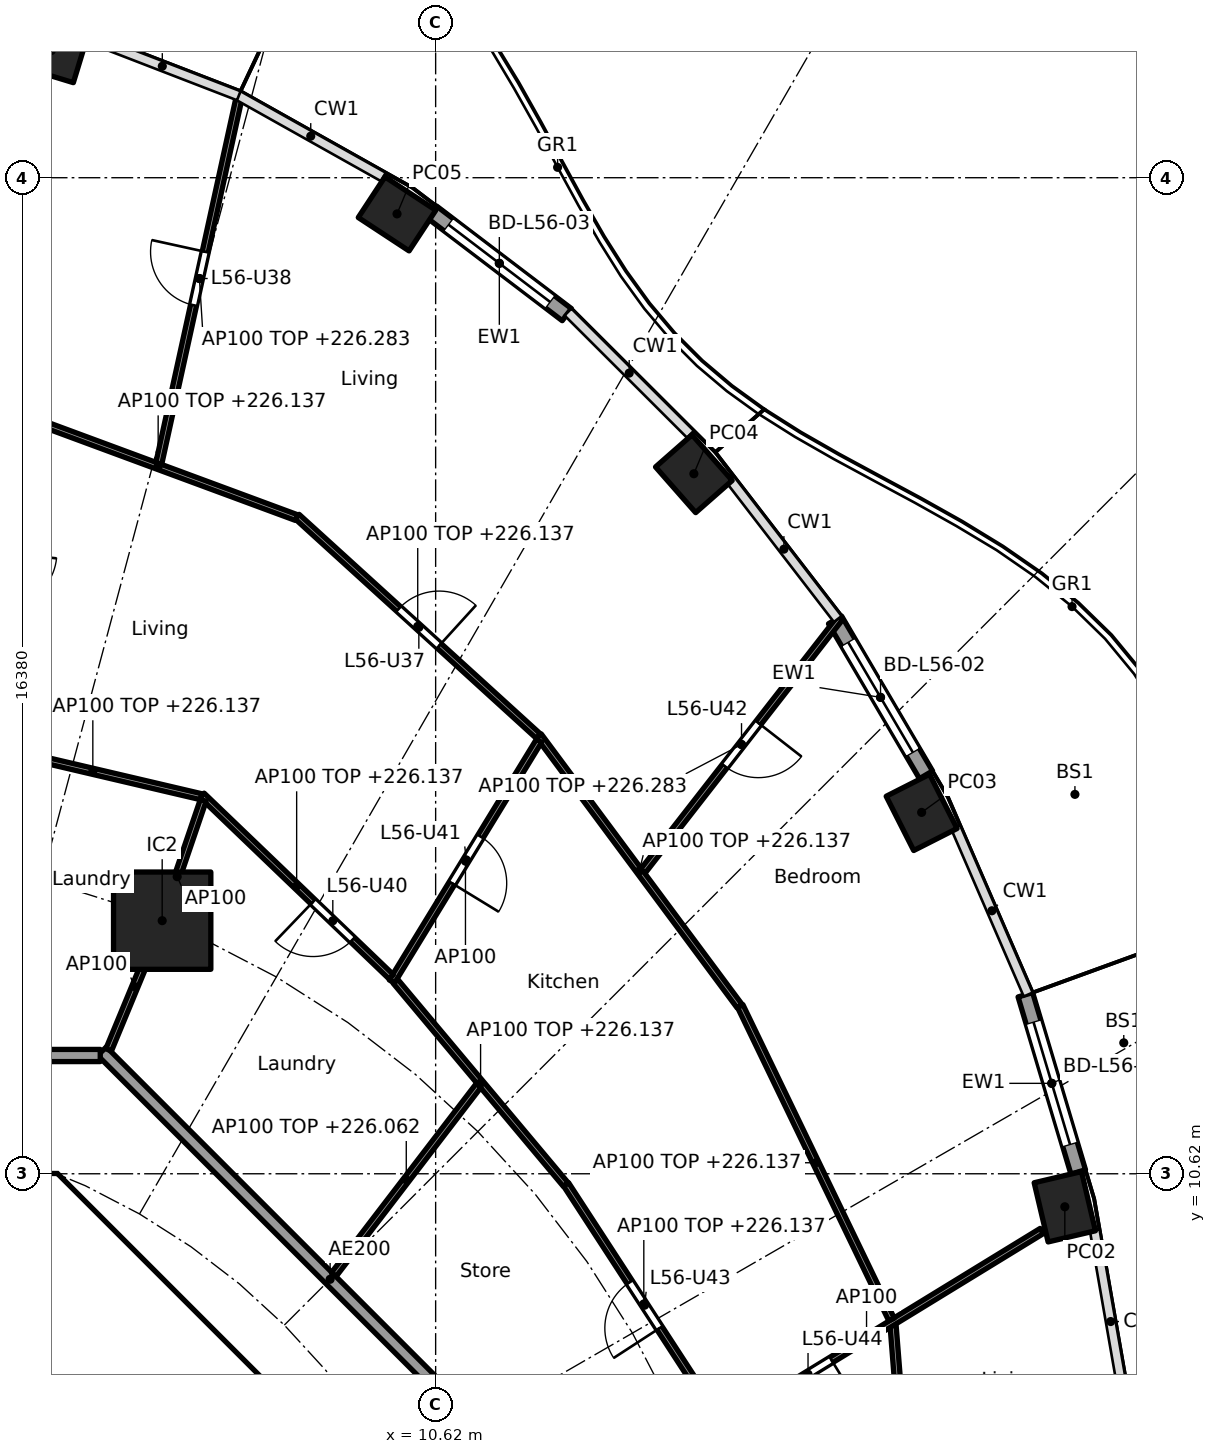
"""IFC4 building model, lengths in metres.
Left out: names, types, materials, properties, quantities, classifications, styles, units other than length and angle.
Written with IfcOpenShell. Run it as: python <this file> out.ifc"""

import sys

from ifc_helpers import new_model, si_unit, direction, frame, frame_2d, origin, origin_2d, place, context, subcontext, project, spatial, polyline, rectangle, hollow_rectangle, outline, extrude, element, fill, save


model = new_model("IFC4")
c1 = context("Model", 3, precision=1e-05, world=origin(), true_north=direction((0.0, 1.0)))
c2 = subcontext(c1, "Body", "Model", "MODEL_VIEW")
j1 = project(units=[si_unit("LENGTHUNIT", "METRE"), si_unit("PLANEANGLEUNIT", "RADIAN")], contexts=[c1])
p1 = place(None, origin())
s1 = spatial("IfcSite", under=j1, at=p1, CompositionType="ELEMENT")
p2 = place(p1, origin())
s2 = spatial("IfcBuilding", under=s1, at=p2, CompositionType="ELEMENT")
p3 = place(p2, frame((0.0, 0.0, 223.3)))
s3 = spatial("IfcBuildingStorey", under=s2, at=p3, CompositionType="ELEMENT", Elevation=223.3)
for number, where, z_axis, x_axis in (
    (1, (20.967, 10.077, 0.0), (0.0, 0.0, 1.0), (-0.229, 0.973, 0.0)),
    (2, (18.612, 16.563, 0.0), (0.0, 0.0, 1.0), (-0.452, 0.892, 0.0)),
    (3, (14.866, 22.132, 0.0), (0.0, 0.0, 1.0), (-0.66, 0.751, 0.0)),
    (4, (9.985, 26.405, 0.0), (0.0, 0.0, 1.0), (-0.836, 0.549, 0.0)),
    (5, (4.3, 29.092, 0.0), (0.0, 0.0, 1.0), (-0.957, 0.292, 0.0)),
):
    element("IfcColumn", number, at=place(p3, frame(where, z_axis=z_axis, x_axis=x_axis)), inside=s3, PredefinedType="COLUMN", context=c2, shape_type="SweptSolid", body=[
        extrude(hollow_rectangle(XDim=1.0, YDim=0.8, WallThickness=0.032, at=origin_2d()), origin(), (0.0, 0.0, 1.0), 3.7),
    ])
p4 = place(p3, frame((6.123, 14.782, 0.0), z_axis=(0.0, 0.0, 1.0), x_axis=(1.0, 0.0, 0.0)))
e6 = element("IfcColumn", 6, at=p4, inside=s3, PredefinedType="COLUMN", context=c2, shape_type="SweptSolid", body=[
    extrude(rectangle(XDim=1.6, YDim=1.6, at=origin_2d()), origin(), (0.0, 0.0, 1.0), 3.7),
])
p5 = place(p3, frame((20.318, 13.564, 0.0), z_axis=(0.0, 0.0, 1.0), x_axis=(0.285785716255, -0.958293548128, 0.0)))
e7 = element("IfcWall", 7, at=p5, inside=s3, PredefinedType="SOLIDWALL", context=c2, shape_type="SweptSolid", body=[
    extrude(rectangle(XDim=3.04, YDim=0.25, at=frame_2d((1.52, 0.0))), origin(), (0.0, 0.0, 1.0), 3.44),
])
p6 = place(p5, frame((0.47, 0.0, 0.0)))
e8 = element("IfcOpeningElement", 8, at=p6, cuts=e7, PredefinedType="OPENING", context=c2, shape_type="SweptSolid", body=[
    extrude(rectangle(XDim=2.1, YDim=2.4, at=frame_2d((1.05, 1.2))), frame((0.0, 0.135, 0.0), z_axis=(0.0, -1.0, 0.0), x_axis=(1.0, 0.0, 0.0)), (0.0, 0.0, 1.0), 0.27),
])
p7 = place(p3, frame((17.188, 19.728, 0.0), z_axis=(0.0, 0.0, 1.0), x_axis=(0.506391620556, -0.862303616269, 0.0)))
e9 = element("IfcWall", 9, at=p7, inside=s3, PredefinedType="SOLIDWALL", context=c2, shape_type="SweptSolid", body=[
    extrude(rectangle(XDim=2.954, YDim=0.25, at=frame_2d((1.477, 0.0))), origin(), (0.0, 0.0, 1.0), 3.44),
])
p8 = place(p7, frame((0.427, 0.0, 0.0)))
e10 = element("IfcOpeningElement", 10, at=p8, cuts=e9, PredefinedType="OPENING", context=c2, shape_type="SweptSolid", body=[
    extrude(rectangle(XDim=2.1, YDim=2.4, at=frame_2d((1.05, 1.2))), frame((0.0, 0.135, 0.0), z_axis=(0.0, -1.0, 0.0), x_axis=(1.0, 0.0, 0.0)), (0.0, 0.0, 1.0), 0.27),
])
p9 = place(p3, frame((10.557, 26.436, 0.0), z_axis=(0.0, 0.0, 1.0), x_axis=(0.796022158395, -0.605267480825, 0.0)))
e11 = element("IfcWall", 11, at=p9, inside=s3, PredefinedType="SOLIDWALL", context=c2, shape_type="SweptSolid", body=[
    extrude(rectangle(XDim=2.789, YDim=0.25, at=frame_2d((1.395, 0.0))), origin(), (0.0, 0.0, 1.0), 3.44),
])
p10 = place(p9, frame((0.344, 0.0, 0.0)))
e12 = element("IfcOpeningElement", 12, at=p10, cuts=e11, PredefinedType="OPENING", context=c2, shape_type="SweptSolid", body=[
    extrude(rectangle(XDim=2.1, YDim=2.4, at=frame_2d((1.05, 1.2))), frame((0.0, 0.135, 0.0), z_axis=(0.0, -1.0, 0.0), x_axis=(1.0, 0.0, 0.0)), (0.0, 0.0, 1.0), 0.27),
])
p11 = place(p3, frame((9.988, 4.613, 0.0), z_axis=(0.0, 0.0, 1.0), x_axis=(-0.707106781187, 0.707106781187, 0.0)))
e13 = element("IfcWall", 13, at=p11, inside=s3, PredefinedType="SHEAR", context=c2, shape_type="SweptSolid", body=[
    extrude(rectangle(XDim=7.602, YDim=0.6, at=frame_2d((3.801, 0.0))), origin(), (0.0, 0.0, 1.0), 3.44),
])
p12 = place(p11, frame((3.201, 0.0, 0.0)))
e14 = element("IfcOpeningElement", 14, at=p12, cuts=e13, PredefinedType="OPENING", context=c2, shape_type="SweptSolid", body=[
    extrude(rectangle(XDim=1.2, YDim=2.1, at=frame_2d((0.6, 1.05))), frame((0.0, 0.31, 0.0), z_axis=(0.0, -1.0, 0.0), x_axis=(1.0, 0.0, 0.0)), (0.0, 0.0, 1.0), 0.62),
])
p13 = place(p3, origin())
e15 = element("IfcWall", 15, at=p13, inside=s3, PredefinedType="SHEAR", context=c2, shape_type="SweptSolid", body=[
    extrude(outline(polyline([(-4.152, 10.025), (-4.401, 9.776), (-4.825, 10.2), (-4.401, 10.625), (4.401, 10.625), (4.825, 10.2), (4.401, 9.776), (4.152, 10.025), (-4.152, 10.025)])), origin(), (0.0, 0.0, 1.0), 3.44),
])
p14 = place(p3, frame((12.635, 5.134, 0.0), z_axis=(0.0, 0.0, 1.0), x_axis=(-0.707106781187, 0.707106781187, 0.0)))
e16 = element("IfcWall", 16, at=p14, inside=s3, PredefinedType="PARTITIONING", context=c2, shape_type="SweptSolid", body=[
    extrude(rectangle(XDim=10.609, YDim=0.2, at=frame_2d((5.305, 0.0))), origin(), (0.0, 0.0, 1.0), 3.44),
])
p15 = place(p3, frame((5.104, 12.565, 0.0), z_axis=(0.0, 0.0, 1.0), x_axis=(-1.0, 0.0, 0.0)))
e17 = element("IfcWall", 17, at=p15, inside=s3, PredefinedType="PARTITIONING", context=c2, shape_type="SweptSolid", body=[
    extrude(rectangle(XDim=10.409, YDim=0.2, at=frame_2d((5.205, 0.0))), origin(), (0.0, 0.0, 1.0), 3.44),
])
p16 = place(p15, frame((3.303, 0.0, 0.0)))
e18 = element("IfcOpeningElement", 18, at=p16, cuts=e17, PredefinedType="OPENING", context=c2, shape_type="SweptSolid", body=[
    extrude(rectangle(XDim=1.0, YDim=2.1, at=frame_2d((0.5, 1.05))), frame((0.0, 0.11, 0.0), z_axis=(0.0, -1.0, 0.0), x_axis=(1.0, 0.0, 0.0)), (0.0, 0.0, 1.0), 0.22),
])
p17 = place(p3, frame((18.578, 2.642, 0.0), z_axis=(0.0, 0.0, 1.0), x_axis=(-0.079179272956, 0.9968603928, 0.0)))
e19 = element("IfcWall", 19, at=p17, inside=s3, PredefinedType="PARTITIONING", context=c2, shape_type="SweptSolid", body=[
    extrude(rectangle(XDim=5.504, YDim=0.1, at=frame_2d((2.752, 0.0))), origin(), (0.0, 0.0, 1.0), 2.837),
])
p18 = place(p17, frame((2.302, 0.0, 0.0)))
e20 = element("IfcOpeningElement", 20, at=p18, cuts=e19, PredefinedType="OPENING", context=c2, shape_type="SweptSolid", body=[
    extrude(rectangle(XDim=0.9, YDim=2.1, at=frame_2d((0.45, 1.05))), frame((0.0, 0.06, 0.0), z_axis=(0.0, -1.0, 0.0), x_axis=(1.0, 0.0, 0.0)), (0.0, 0.0, 1.0), 0.12),
])
p19 = place(p3, frame((14.825, 6.149, 0.0), z_axis=(0.0, 0.0, 1.0), x_axis=(0.852781365284, 0.522268075824, 0.0)))
e21 = element("IfcWall", 21, at=p19, inside=s3, PredefinedType="PARTITIONING", context=c2, shape_type="SweptSolid", body=[
    extrude(rectangle(XDim=6.758, YDim=0.1, at=frame_2d((3.379, 0.0))), origin(), (0.0, 0.0, 1.0), 3.44),
])
p20 = place(p19, frame((1.801, 0.0, 0.0)))
e22 = element("IfcOpeningElement", 22, at=p20, cuts=e21, PredefinedType="OPENING", context=c2, shape_type="SweptSolid", body=[
    extrude(rectangle(XDim=0.9, YDim=2.1, at=frame_2d((0.45, 1.05))), frame((0.0, 0.06, 0.0), z_axis=(0.0, -1.0, 0.0), x_axis=(1.0, 0.0, 0.0)), (0.0, 0.0, 1.0), 0.12),
])
p21 = place(p3, frame((15.323, 6.512, 0.0), z_axis=(0.0, 0.0, 1.0), x_axis=(-0.545191322361, 0.8383116497, 0.0)))
e23 = element("IfcWall", 23, at=p21, inside=s3, PredefinedType="PARTITIONING", context=c2, shape_type="SweptSolid", body=[
    extrude(rectangle(XDim=4.693, YDim=0.1, at=frame_2d((2.346, 0.0))), origin(), (0.0, 0.0, 1.0), 2.837),
])
p22 = place(p21, frame((1.871, 0.0, 0.0)))
e24 = element("IfcOpeningElement", 24, at=p22, cuts=e23, PredefinedType="OPENING", context=c2, shape_type="SweptSolid", body=[
    extrude(rectangle(XDim=0.9, YDim=2.1, at=frame_2d((0.45, 1.05))), frame((0.0, 0.06, 0.0), z_axis=(0.0, -1.0, 0.0), x_axis=(1.0, 0.0, 0.0)), (0.0, 0.0, 1.0), 0.12),
])
p23 = place(p3, frame((18.117, 8.224, 0.0), z_axis=(0.0, 0.0, 1.0), x_axis=(-0.434647681571, 0.900600573453, 0.0)))
e25 = element("IfcWall", 25, at=p23, inside=s3, PredefinedType="PARTITIONING", context=c2, shape_type="SweptSolid", body=[
    extrude(rectangle(XDim=5.724, YDim=0.1, at=frame_2d((2.862, 0.0))), origin(), (0.0, 0.0, 1.0), 2.837),
])
p24 = place(p3, frame((12.759, 10.443, 0.0), z_axis=(0.0, 0.0, 1.0), x_axis=(-0.642225196965, 0.766516011825, 0.0)))
e26 = element("IfcWall", 26, at=p24, inside=s3, PredefinedType="PARTITIONING", context=c2, shape_type="SweptSolid", body=[
    extrude(rectangle(XDim=4.361, YDim=0.1, at=frame_2d((2.18, 0.0))), origin(), (0.0, 0.0, 1.0), 2.837),
])
p25 = place(p3, frame((15.621, 13.374, 0.0), z_axis=(0.0, 0.0, 1.0), x_axis=(-0.596165830899, 0.802861321816, 0.0)))
e27 = element("IfcWall", 27, at=p25, inside=s3, PredefinedType="PARTITIONING", context=c2, shape_type="SweptSolid", body=[
    extrude(rectangle(XDim=5.542, YDim=0.1, at=frame_2d((2.771, 0.0))), origin(), (0.0, 0.0, 1.0), 2.837),
])
p26 = place(p3, frame((8.946, 8.964, 0.0), z_axis=(0.0, 0.0, 1.0), x_axis=(0.608213063121, 0.793773815296, 0.0)))
e28 = element("IfcWall", 28, at=p26, inside=s3, PredefinedType="PARTITIONING", context=c2, shape_type="SweptSolid", body=[
    extrude(rectangle(XDim=3.918, YDim=0.1, at=frame_2d((1.959, 0.0))), origin(), (0.0, 0.0, 1.0), 2.762),
])
p27 = place(p3, frame((14.029, 15.598, 0.0), z_axis=(0.0, 0.0, 1.0), x_axis=(0.614558710688, 0.788871086501, 0.0)))
e29 = element("IfcWall", 29, at=p27, inside=s3, PredefinedType="PARTITIONING", context=c2, shape_type="SweptSolid", body=[
    extrude(rectangle(XDim=5.276, YDim=0.1, at=frame_2d((2.638, 0.0))), origin(), (0.0, 0.0, 1.0), 2.983),
])
p28 = place(p27, frame((2.188, 0.0, 0.0)))
e30 = element("IfcOpeningElement", 30, at=p28, cuts=e29, PredefinedType="OPENING", context=c2, shape_type="SweptSolid", body=[
    extrude(rectangle(XDim=0.9, YDim=2.1, at=frame_2d((0.45, 1.05))), frame((0.0, 0.06, 0.0), z_axis=(0.0, -1.0, 0.0), x_axis=(1.0, 0.0, 0.0)), (0.0, 0.0, 1.0), 0.12),
])
p29 = place(p3, frame((9.9, 13.781, 0.0), z_axis=(0.0, 0.0, 1.0), x_axis=(0.521464905534, 0.853272730313, 0.0)))
e31 = element("IfcWall", 31, at=p29, inside=s3, PredefinedType="PARTITIONING", context=c2, shape_type="SweptSolid", body=[
    extrude(rectangle(XDim=4.641, YDim=0.1, at=frame_2d((2.32, 0.0))), origin(), (0.0, 0.0, 1.0), 3.44),
])
p30 = place(p29, frame((1.895, 0.0, 0.0)))
e32 = element("IfcOpeningElement", 32, at=p30, cuts=e31, PredefinedType="OPENING", context=c2, shape_type="SweptSolid", body=[
    extrude(rectangle(XDim=0.9, YDim=2.1, at=frame_2d((0.45, 1.05))), frame((0.0, 0.06, 0.0), z_axis=(0.0, -1.0, 0.0), x_axis=(1.0, 0.0, 0.0)), (0.0, 0.0, 1.0), 0.12),
])
p31 = place(p3, frame((9.89, 13.858, 0.0), z_axis=(0.0, 0.0, 1.0), x_axis=(-0.72167233993, 0.692234811159, 0.0)))
e33 = element("IfcWall", 33, at=p31, inside=s3, PredefinedType="PARTITIONING", context=c2, shape_type="SweptSolid", body=[
    extrude(rectangle(XDim=4.313, YDim=0.1, at=frame_2d((2.156, 0.0))), origin(), (0.0, 0.0, 1.0), 2.837),
])
p32 = place(p31, frame((0.883, 0.0, 0.0)))
e34 = element("IfcOpeningElement", 34, at=p32, cuts=e33, PredefinedType="OPENING", context=c2, shape_type="SweptSolid", body=[
    extrude(rectangle(XDim=0.9, YDim=2.1, at=frame_2d((0.45, 1.05))), frame((0.0, 0.06, 0.0), z_axis=(0.0, -1.0, 0.0), x_axis=(1.0, 0.0, 0.0)), (0.0, 0.0, 1.0), 0.12),
])
p33 = place(p3, frame((12.31, 17.817, 0.0), z_axis=(0.0, 0.0, 1.0), x_axis=(-0.739697052892, 0.672940019573, 0.0)))
e35 = element("IfcWall", 35, at=p33, inside=s3, PredefinedType="PARTITIONING", context=c2, shape_type="SweptSolid", body=[
    extrude(rectangle(XDim=5.365, YDim=0.1, at=frame_2d((2.683, 0.0))), origin(), (0.0, 0.0, 1.0), 2.837),
])
p34 = place(p33, frame((2.208, 0.0, 0.0)))
e36 = element("IfcOpeningElement", 36, at=p34, cuts=e35, PredefinedType="OPENING", context=c2, shape_type="SweptSolid", body=[
    extrude(rectangle(XDim=0.9, YDim=2.1, at=frame_2d((0.45, 1.05))), frame((0.0, 0.06, 0.0), z_axis=(0.0, -1.0, 0.0), x_axis=(1.0, 0.0, 0.0)), (0.0, 0.0, 1.0), 0.12),
])
p35 = place(p3, frame((5.243, 12.657, 0.0), z_axis=(0.0, 0.0, 1.0), x_axis=(0.382719158442, 0.923864733477, 0.0)))
e37 = element("IfcWall", 37, at=p35, inside=s3, PredefinedType="PARTITIONING", context=c2, shape_type="SweptSolid", body=[
    extrude(rectangle(XDim=2.25, YDim=0.1, at=frame_2d((1.125, 0.0))), origin(), (0.0, 0.0, 1.0), 3.44),
])
p36 = place(p3, frame((6.139, 14.829, 0.0), z_axis=(0.0, 0.0, 1.0), x_axis=(0.32278593828, 0.946471995385, 0.0)))
e38 = element("IfcWall", 38, at=p36, inside=s3, PredefinedType="PARTITIONING", context=c2, shape_type="SweptSolid", body=[
    extrude(rectangle(XDim=2.042, YDim=0.1, at=frame_2d((1.021, 0.0))), origin(), (0.0, 0.0, 1.0), 3.44),
])
p37 = place(p3, frame((6.766, 16.82, 0.0), z_axis=(0.0, 0.0, 1.0), x_axis=(-0.973612608559, 0.22820711745, 0.0)))
e39 = element("IfcWall", 39, at=p37, inside=s3, PredefinedType="PARTITIONING", context=c2, shape_type="SweptSolid", body=[
    extrude(rectangle(XDim=3.663, YDim=0.1, at=frame_2d((1.832, 0.0))), origin(), (0.0, 0.0, 1.0), 2.837),
])
p38 = place(p3, frame((8.331, 21.411, 0.0), z_axis=(0.0, 0.0, 1.0), x_axis=(-0.937891982431, 0.346927412136, 0.0)))
e40 = element("IfcWall", 40, at=p38, inside=s3, PredefinedType="PARTITIONING", context=c2, shape_type="SweptSolid", body=[
    extrude(rectangle(XDim=4.85, YDim=0.1, at=frame_2d((2.425, 0.0))), origin(), (0.0, 0.0, 1.0), 2.837),
])
p39 = place(p3, frame((6.067, 22.301, 0.0), z_axis=(0.0, 0.0, 1.0), x_axis=(0.214401821533, 0.976745544614, 0.0)))
e41 = element("IfcWall", 41, at=p39, inside=s3, PredefinedType="PARTITIONING", context=c2, shape_type="SweptSolid", body=[
    extrude(rectangle(XDim=6.228, YDim=0.1, at=frame_2d((3.114, 0.0))), origin(), (0.0, 0.0, 1.0), 2.983),
])
p40 = place(p39, frame((2.664, 0.0, 0.0)))
e42 = element("IfcOpeningElement", 42, at=p40, cuts=e41, PredefinedType="OPENING", context=c2, shape_type="SweptSolid", body=[
    extrude(rectangle(XDim=0.9, YDim=2.1, at=frame_2d((0.45, 1.05))), frame((0.0, 0.06, 0.0), z_axis=(0.0, -1.0, 0.0), x_axis=(1.0, 0.0, 0.0)), (0.0, 0.0, 1.0), 0.12),
])
p41 = place(p6, origin())
e43 = element("IfcDoor", 43, at=p41, inside=s3, OperationType="SLIDING_TO_LEFT", PredefinedType="DOOR", context=c2, shape_type="SweptSolid", body=[
    extrude(rectangle(XDim=2.1, YDim=2.4, at=frame_2d((1.05, 1.2))), frame((0.0, 0.025, 0.0), z_axis=(0.0, -1.0, 0.0), x_axis=(1.0, 0.0, 0.0)), (0.0, 0.0, 1.0), 0.05),
])
fill(e8, e43)
p42 = place(p8, origin())
e44 = element("IfcDoor", 44, at=p42, inside=s3, OperationType="SLIDING_TO_LEFT", PredefinedType="DOOR", context=c2, shape_type="SweptSolid", body=[
    extrude(rectangle(XDim=2.1, YDim=2.4, at=frame_2d((1.05, 1.2))), frame((0.0, 0.025, 0.0), z_axis=(0.0, -1.0, 0.0), x_axis=(1.0, 0.0, 0.0)), (0.0, 0.0, 1.0), 0.05),
])
fill(e10, e44)
p43 = place(p10, origin())
e45 = element("IfcDoor", 45, at=p43, inside=s3, OperationType="SLIDING_TO_LEFT", PredefinedType="DOOR", context=c2, shape_type="SweptSolid", body=[
    extrude(rectangle(XDim=2.1, YDim=2.4, at=frame_2d((1.05, 1.2))), frame((0.0, 0.025, 0.0), z_axis=(0.0, -1.0, 0.0), x_axis=(1.0, 0.0, 0.0)), (0.0, 0.0, 1.0), 0.05),
])
fill(e12, e45)
p44 = place(p12, origin())
e46 = element("IfcDoor", 46, at=p44, inside=s3, OperationType="SINGLE_SWING_LEFT", PredefinedType="DOOR", context=c2, shape_type="SweptSolid", body=[
    extrude(rectangle(XDim=1.2, YDim=2.1, at=frame_2d((0.6, 1.05))), frame((0.0, 0.025, 0.0), z_axis=(0.0, -1.0, 0.0), x_axis=(1.0, 0.0, 0.0)), (0.0, 0.0, 1.0), 0.05),
])
fill(e14, e46)
p45 = place(p34, frame((0.9, 0.0, 0.0), x_axis=(-1.0, 0.0, 0.0)))
e47 = element("IfcDoor", 47, at=p45, inside=s3, OperationType="SINGLE_SWING_RIGHT", PredefinedType="DOOR", context=c2, shape_type="SweptSolid", body=[
    extrude(rectangle(XDim=0.9, YDim=2.1, at=frame_2d((0.45, 1.05))), frame((0.0, 0.025, 0.0), z_axis=(0.0, -1.0, 0.0), x_axis=(1.0, 0.0, 0.0)), (0.0, 0.0, 1.0), 0.05),
])
fill(e36, e47)
p46 = place(p40, origin())
e48 = element("IfcDoor", 48, at=p46, inside=s3, OperationType="SINGLE_SWING_RIGHT", PredefinedType="DOOR", context=c2, shape_type="SweptSolid", body=[
    extrude(rectangle(XDim=0.9, YDim=2.1, at=frame_2d((0.45, 1.05))), frame((0.0, 0.025, 0.0), z_axis=(0.0, -1.0, 0.0), x_axis=(1.0, 0.0, 0.0)), (0.0, 0.0, 1.0), 0.05),
])
fill(e42, e48)
p47 = place(p32, origin())
e49 = element("IfcDoor", 49, at=p47, inside=s3, OperationType="SINGLE_SWING_RIGHT", PredefinedType="DOOR", context=c2, shape_type="SweptSolid", body=[
    extrude(rectangle(XDim=0.9, YDim=2.1, at=frame_2d((0.45, 1.05))), frame((0.0, 0.025, 0.0), z_axis=(0.0, -1.0, 0.0), x_axis=(1.0, 0.0, 0.0)), (0.0, 0.0, 1.0), 0.05),
])
fill(e34, e49)
p48 = place(p30, frame((0.9, 0.0, 0.0), x_axis=(-1.0, 0.0, 0.0)))
e50 = element("IfcDoor", 50, at=p48, inside=s3, OperationType="SINGLE_SWING_RIGHT", PredefinedType="DOOR", context=c2, shape_type="SweptSolid", body=[
    extrude(rectangle(XDim=0.9, YDim=2.1, at=frame_2d((0.45, 1.05))), frame((0.0, 0.025, 0.0), z_axis=(0.0, -1.0, 0.0), x_axis=(1.0, 0.0, 0.0)), (0.0, 0.0, 1.0), 0.05),
])
fill(e32, e50)
p49 = place(p28, frame((0.9, 0.0, 0.0), x_axis=(-1.0, 0.0, 0.0)))
e51 = element("IfcDoor", 51, at=p49, inside=s3, OperationType="SINGLE_SWING_LEFT", PredefinedType="DOOR", context=c2, shape_type="SweptSolid", body=[
    extrude(rectangle(XDim=0.9, YDim=2.1, at=frame_2d((0.45, 1.05))), frame((0.0, 0.025, 0.0), z_axis=(0.0, -1.0, 0.0), x_axis=(1.0, 0.0, 0.0)), (0.0, 0.0, 1.0), 0.05),
])
fill(e30, e51)
p50 = place(p22, origin())
e52 = element("IfcDoor", 52, at=p50, inside=s3, OperationType="SINGLE_SWING_LEFT", PredefinedType="DOOR", context=c2, shape_type="SweptSolid", body=[
    extrude(rectangle(XDim=0.9, YDim=2.1, at=frame_2d((0.45, 1.05))), frame((0.0, 0.025, 0.0), z_axis=(0.0, -1.0, 0.0), x_axis=(1.0, 0.0, 0.0)), (0.0, 0.0, 1.0), 0.05),
])
fill(e24, e52)
p51 = place(p20, frame((0.9, 0.0, 0.0), x_axis=(-1.0, 0.0, 0.0)))
e53 = element("IfcDoor", 53, at=p51, inside=s3, OperationType="SINGLE_SWING_LEFT", PredefinedType="DOOR", context=c2, shape_type="SweptSolid", body=[
    extrude(rectangle(XDim=0.9, YDim=2.1, at=frame_2d((0.45, 1.05))), frame((0.0, 0.025, 0.0), z_axis=(0.0, -1.0, 0.0), x_axis=(1.0, 0.0, 0.0)), (0.0, 0.0, 1.0), 0.05),
])
fill(e22, e53)
save(model, sys.argv[1])
